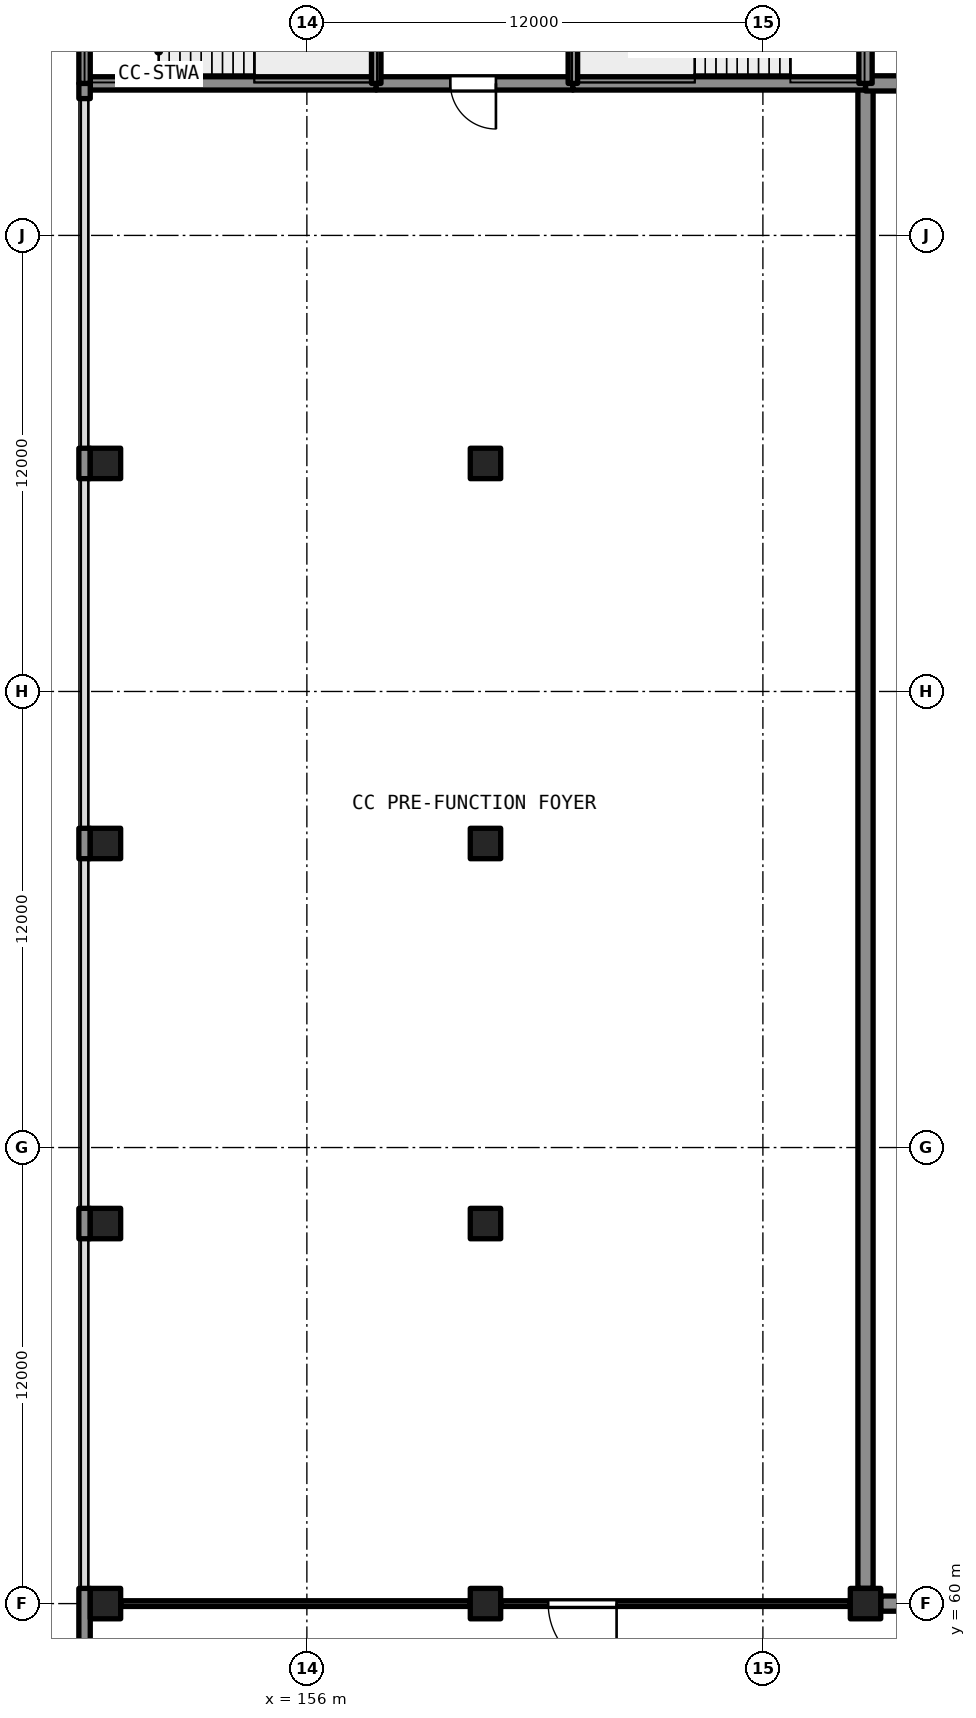
"""IFC4 building model, lengths in metres.
Left out: names, types, materials, properties, quantities, classifications, styles, units other than length and angle.
Written with IfcOpenShell. Run it as: python <this file> out.ifc"""

import sys

from ifc_helpers import new_model, si_unit, direction, frame, frame_2d, origin, origin_2d, place, context, subcontext, project, spatial, rectangle, extrude, element, fill, save


model = new_model("IFC4")
c1 = context("Model", 3, precision=1e-05, world=origin(), true_north=direction((0.0, 1.0)))
c2 = subcontext(c1, "Body", "Model", "MODEL_VIEW")
j1 = project(units=[si_unit("LENGTHUNIT", "METRE"), si_unit("PLANEANGLEUNIT", "RADIAN")], contexts=[c1])
p1 = place(None, origin())
s1 = spatial("IfcSite", under=j1, at=p1, CompositionType="ELEMENT")
p2 = place(p1, origin())
s2 = spatial("IfcBuilding", under=s1, at=p2, CompositionType="ELEMENT")
p3 = place(p2, frame((0.0, 0.0, 9.0)))
s3 = spatial("IfcBuildingStorey", under=s2, at=p3, CompositionType="ELEMENT", Elevation=9.0)
for number, where, z_axis, x_axis in (
    (1, (150.7, 60.0, 0.0), (0.0, 0.0, 1.0), (1.0, 0.0, 0.0)),
    (2, (150.7, 70.0, 0.0), (0.0, 0.0, 1.0), (1.0, 0.0, 0.0)),
    (3, (150.7, 80.0, 0.0), (0.0, 0.0, 1.0), (1.0, 0.0, 0.0)),
    (4, (150.7, 90.0, 0.0), (0.0, 0.0, 1.0), (1.0, 0.0, 0.0)),
    (5, (160.7, 60.0, 0.0), (0.0, 0.0, 1.0), (1.0, 0.0, 0.0)),
    (6, (160.7, 70.0, 0.0), (0.0, 0.0, 1.0), (1.0, 0.0, 0.0)),
    (7, (160.7, 80.0, 0.0), (0.0, 0.0, 1.0), (1.0, 0.0, 0.0)),
    (8, (160.7, 90.0, 0.0), (0.0, 0.0, 1.0), (1.0, 0.0, 0.0)),
    (9, (170.7, 60.0, 0.0), (0.0, 0.0, 1.0), (1.0, 0.0, 0.0)),
):
    element("IfcColumn", number, at=place(p3, frame(where, z_axis=z_axis, x_axis=x_axis)), inside=s3, PredefinedType="COLUMN", context=c2, shape_type="SweptSolid", body=[
        extrude(rectangle(XDim=0.8, YDim=0.8, at=origin_2d()), origin(), (0.0, 0.0, 1.0), 6.0),
    ])
p4 = place(p3, frame((170.7, 60.4, 0.0), z_axis=(0.0, 0.0, 1.0), x_axis=(0.0, 1.0, 0.0)))
e10 = element("IfcWall", 10, at=p4, inside=s3, PredefinedType="SHEAR", context=c2, shape_type="SweptSolid", body=[
    extrude(rectangle(XDim=39.6, YDim=0.4, at=frame_2d((19.8, 0.0))), origin(), (0.0, 0.0, 1.0), 5.59),
])
p5 = place(p3, frame((171.1, 60.0, 0.0), z_axis=(0.0, 0.0, 1.0), x_axis=(1.0, 0.0, 0.0)))
e11 = element("IfcWall", 11, at=p5, inside=s3, PredefinedType="SHEAR", context=c2, shape_type="SweptSolid", body=[
    extrude(rectangle(XDim=9.2, YDim=0.4, at=frame_2d((4.6, 0.0))), origin(), (0.0, 0.0, 1.0), 5.59),
])
p6 = place(p3, frame((170.7, 100.0, 0.0), z_axis=(0.0, 0.0, 1.0), x_axis=(1.0, 0.0, 0.0)))
e12 = element("IfcWall", 12, at=p6, inside=s3, PredefinedType="SHEAR", context=c2, shape_type="SweptSolid", body=[
    extrude(rectangle(XDim=9.6, YDim=0.4, at=frame_2d((4.8, 0.0))), origin(), (0.0, 0.0, 1.0), 5.59),
])
p7 = place(p3, frame((150.3, 100.0, 0.0), z_axis=(0.0, 0.0, 1.0), x_axis=(1.0, 0.0, 0.0)))
e13 = element("IfcWall", 13, at=p7, inside=s3, PredefinedType="SHEAR", context=c2, shape_type="SweptSolid", body=[
    extrude(rectangle(XDim=7.525, YDim=0.35, at=frame_2d((3.762, 0.0))), origin(), (0.0, 0.0, 1.0), 5.59),
])
p8 = place(p3, frame((163.0, 100.0, 0.0), z_axis=(0.0, 0.0, 1.0), x_axis=(-1.0, 0.0, 0.0)))
e14 = element("IfcWall", 14, at=p8, inside=s3, PredefinedType="SHEAR", context=c2, shape_type="SweptSolid", body=[
    extrude(rectangle(XDim=5.175, YDim=0.35, at=frame_2d((2.587, 0.0))), origin(), (0.0, 0.0, 1.0), 5.59),
])
p9 = place(p8, frame((2.025, 0.0, 0.0)))
e15 = element("IfcOpeningElement", 15, at=p9, cuts=e14, PredefinedType="OPENING", context=c2, shape_type="SweptSolid", body=[
    extrude(rectangle(XDim=1.2, YDim=2.1, at=frame_2d((0.6, 1.05))), frame((0.0, 0.186, 0.0), z_axis=(0.0, -1.0, 0.0), x_axis=(1.0, 0.0, 0.0)), (0.0, 0.0, 1.0), 0.371),
])
p10 = place(p3, frame((163.0, 100.0, 0.0), z_axis=(0.0, 0.0, 1.0), x_axis=(1.0, 0.0, 0.0)))
e16 = element("IfcWall", 16, at=p10, inside=s3, PredefinedType="SHEAR", context=c2, shape_type="SweptSolid", body=[
    extrude(rectangle(XDim=7.7, YDim=0.35, at=frame_2d((3.85, 0.0))), origin(), (0.0, 0.0, 1.0), 5.59),
])
p11 = place(p3, frame((170.7, 100.0, 0.0), z_axis=(0.0, 0.0, 1.0), x_axis=(0.0, 1.0, 0.0)))
e17 = element("IfcWall", 17, at=p11, inside=s3, PredefinedType="SHEAR", context=c2, shape_type="SweptSolid", body=[
    extrude(rectangle(XDim=3.15, YDim=0.35, at=frame_2d((1.575, 0.0))), origin(), (0.0, 0.0, 1.0), 5.59),
])
for number, where, z_axis, x_axis in (
    (18, (157.825, 100.0, 0.0), (0.0, 0.0, 1.0), (0.0, 1.0, 0.0)),
    (19, (163.0, 100.0, 0.0), (0.0, 0.0, 1.0), (0.0, 1.0, 0.0)),
):
    element("IfcWall", number, at=place(p3, frame(where, z_axis=z_axis, x_axis=x_axis)), inside=s3, PredefinedType="SHEAR", context=c2, shape_type="SweptSolid", body=[
        extrude(rectangle(XDim=3.15, YDim=0.25, at=frame_2d((1.575, 0.0))), origin(), (0.0, 0.0, 1.0), 5.59),
    ])
p12 = place(p3, frame((150.15, 49.45, 0.0), z_axis=(0.0, 0.0, 1.0), x_axis=(0.0, 1.0, 0.0)))
e20 = element("IfcWall", 20, at=p12, inside=s3, PredefinedType="SOLIDWALL", context=c2, shape_type="SweptSolid", body=[
    extrude(rectangle(XDim=10.95, YDim=0.3, at=frame_2d((5.475, 0.0))), origin(), (0.0, 0.0, 1.0), 5.59),
])
for number, where, z_axis, x_axis in (
    (21, (150.15, 69.6, 0.0), (0.0, 0.0, 1.0), (0.0, 1.0, 0.0)),
    (22, (150.15, 79.6, 0.0), (0.0, 0.0, 1.0), (0.0, 1.0, 0.0)),
    (23, (150.15, 89.6, 0.0), (0.0, 0.0, 1.0), (0.0, 1.0, 0.0)),
):
    element("IfcWall", number, at=place(p3, frame(where, z_axis=z_axis, x_axis=x_axis)), inside=s3, PredefinedType="SOLIDWALL", context=c2, shape_type="SweptSolid", body=[
        extrude(rectangle(XDim=0.8, YDim=0.3, at=frame_2d((0.4, 0.0))), origin(), (0.0, 0.0, 1.0), 5.59),
    ])
p13 = place(p3, frame((150.15, 99.6, 0.0), z_axis=(0.0, 0.0, 1.0), x_axis=(0.0, 1.0, 0.0)))
e24 = element("IfcWall", 24, at=p13, inside=s3, PredefinedType="SOLIDWALL", context=c2, shape_type="SweptSolid", body=[
    extrude(rectangle(XDim=0.4, YDim=0.3, at=frame_2d((0.2, 0.0))), origin(), (0.0, 0.0, 1.0), 5.59),
])
p14 = place(p3, frame((150.15, 100.0, 0.0), z_axis=(0.0, 0.0, 1.0), x_axis=(0.0, 1.0, 0.0)))
e25 = element("IfcWall", 25, at=p14, inside=s3, PredefinedType="SOLIDWALL", context=c2, shape_type="SweptSolid", body=[
    extrude(rectangle(XDim=3.15, YDim=0.3, at=frame_2d((1.575, 0.0))), origin(), (0.0, 0.0, 1.0), 5.59),
])
p15 = place(p3, frame((151.1, 60.0, 0.0), z_axis=(0.0, 0.0, 1.0), x_axis=(1.0, 0.0, 0.0)))
e26 = element("IfcWall", 26, at=p15, inside=s3, PredefinedType="PARTITIONING", context=c2, shape_type="SweptSolid", body=[
    extrude(rectangle(XDim=9.2, YDim=0.15, at=frame_2d((4.6, 0.0))), origin(), (0.0, 0.0, 1.0), 5.59),
])
p16 = place(p3, frame((170.3, 60.0, 0.0), z_axis=(0.0, 0.0, 1.0), x_axis=(-1.0, 0.0, 0.0)))
e27 = element("IfcWall", 27, at=p16, inside=s3, PredefinedType="PARTITIONING", context=c2, shape_type="SweptSolid", body=[
    extrude(rectangle(XDim=9.2, YDim=0.15, at=frame_2d((4.6, 0.0))), origin(), (0.0, 0.0, 1.0), 5.59),
])
p17 = place(p16, frame((6.15, 0.0, 0.0)))
e28 = element("IfcOpeningElement", 28, at=p17, cuts=e27, PredefinedType="OPENING", context=c2, shape_type="SweptSolid", body=[
    extrude(rectangle(XDim=1.8, YDim=2.1, at=frame_2d((0.9, 1.05))), frame((0.0, 0.085, 0.0), z_axis=(0.0, -1.0, 0.0), x_axis=(1.0, 0.0, 0.0)), (0.0, 0.0, 1.0), 0.171),
])
p18 = place(p17, origin())
e29 = element("IfcDoor", 29, at=p18, inside=s3, OperationType="DOUBLE_DOOR_SINGLE_SWING", PredefinedType="DOOR", context=c2, shape_type="SweptSolid", body=[
    extrude(rectangle(XDim=1.8, YDim=2.1, at=frame_2d((0.9, 1.05))), frame((0.0, 0.025, 0.0), z_axis=(0.0, -1.0, 0.0), x_axis=(1.0, 0.0, 0.0)), (0.0, 0.0, 1.0), 0.05),
])
fill(e28, e29)
p19 = place(p9, origin())
e30 = element("IfcDoor", 30, at=p19, inside=s3, OperationType="SINGLE_SWING_LEFT", PredefinedType="DOOR", context=c2, shape_type="SweptSolid", body=[
    extrude(rectangle(XDim=1.2, YDim=2.1, at=frame_2d((0.6, 1.05))), frame((0.0, 0.025, 0.0), z_axis=(0.0, -1.0, 0.0), x_axis=(1.0, 0.0, 0.0)), (0.0, 0.0, 1.0), 0.05),
])
fill(e15, e30)
save(model, sys.argv[1])
